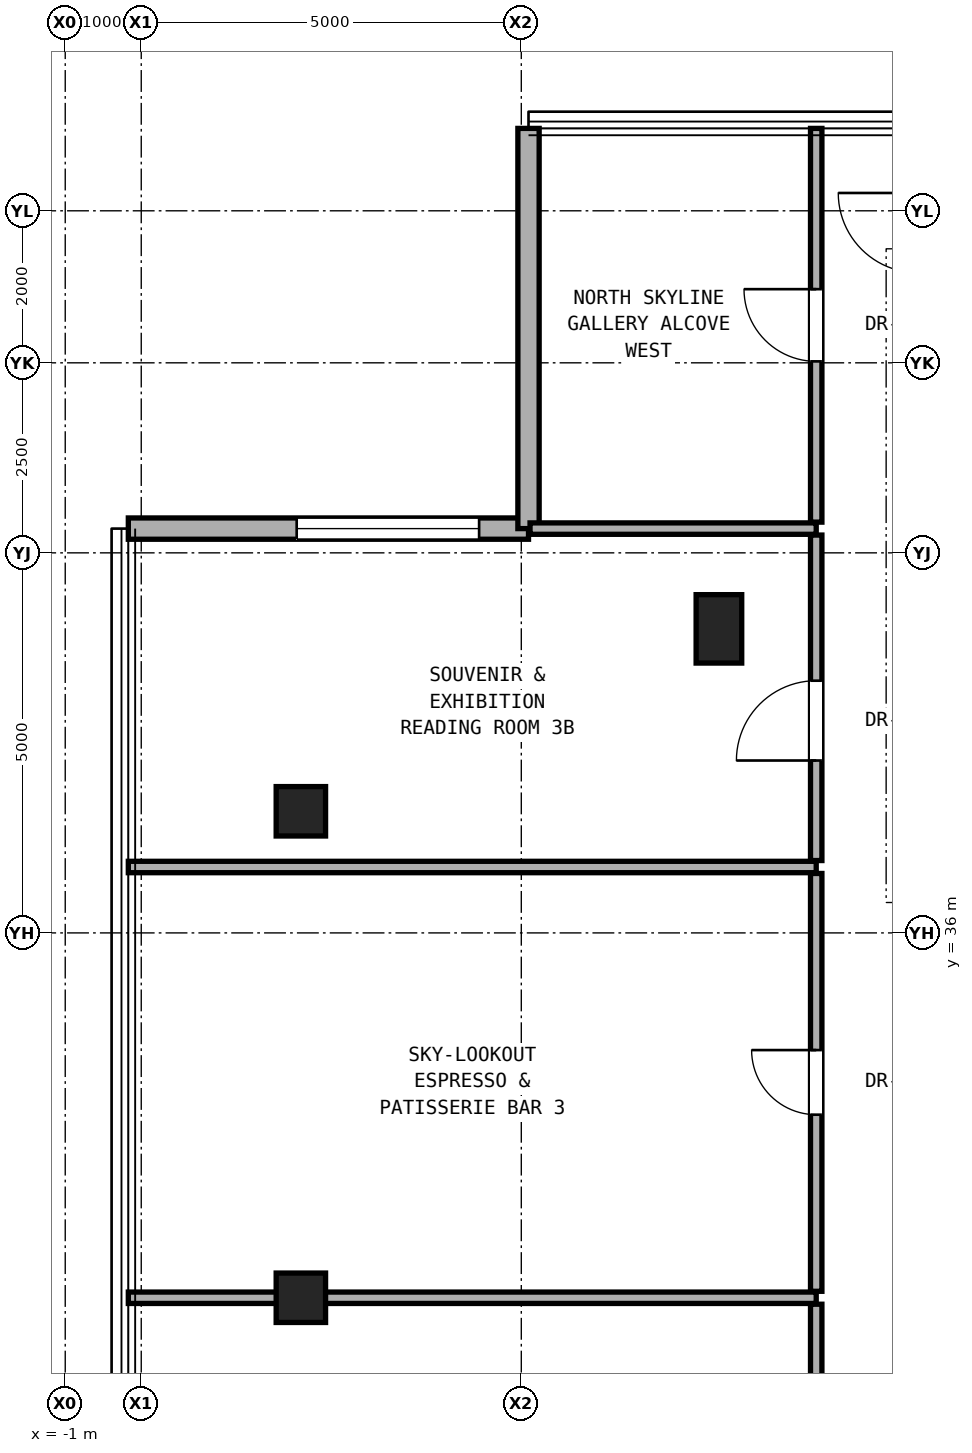
"""IFC4 building model, lengths in metres.
Left out: names, types, materials, properties, quantities, classifications, styles, units other than length and angle.
Written with IfcOpenShell. Run it as: python <this file> out.ifc"""

import sys

from ifc_helpers import new_model, si_unit, direction, frame, frame_2d, origin, origin_2d, place, context, subcontext, project, spatial, rectangle, hollow_rectangle, extrude, element, fill, save


model = new_model("IFC4")
c1 = context("Model", 3, precision=1e-05, world=origin(), true_north=direction((0.0, 1.0)))
c2 = subcontext(c1, "Body", "Model", "MODEL_VIEW")
j1 = project(units=[si_unit("LENGTHUNIT", "METRE"), si_unit("PLANEANGLEUNIT", "RADIAN")], contexts=[c1])
p1 = place(None, origin())
s1 = spatial("IfcSite", under=j1, at=p1, CompositionType="ELEMENT")
p2 = place(p1, origin())
s2 = spatial("IfcBuilding", under=s1, at=p2, CompositionType="ELEMENT")
p3 = place(p2, frame((0.0, 0.0, 259.9)))
s3 = spatial("IfcBuildingStorey", under=s2, at=p3, CompositionType="ELEMENT", Elevation=259.9)
for number, where, z_axis, x_axis in (
    (1, (2.1, 31.2, 0.0), (0.0, 0.0, 1.0), (1.0, 0.0, 0.0)),
    (2, (2.1, 37.6, 0.0), (0.0, 0.0, 1.0), (1.0, 0.0, 0.0)),
):
    element("IfcColumn", number, at=place(p3, frame(where, z_axis=z_axis, x_axis=x_axis)), inside=s3, PredefinedType="COLUMN", context=c2, shape_type="SweptSolid", body=[
        extrude(hollow_rectangle(XDim=0.65, YDim=0.65, WallThickness=0.036, at=origin_2d()), origin(), (0.0, 0.0, 1.0), 3.6),
    ])
p4 = place(p3, frame((7.6, 40.0, 0.0), z_axis=(0.0, 0.0, 1.0), x_axis=(1.0, 0.0, 0.0)))
e3 = element("IfcColumn", 3, at=p4, inside=s3, PredefinedType="PILASTER", context=c2, shape_type="SweptSolid", body=[
    extrude(rectangle(XDim=0.6, YDim=0.9, at=origin_2d()), origin(), (0.0, 0.0, 1.0), 3.6),
])
p5 = place(p3, frame((5.095, 41.319, 0.0), z_axis=(0.0, 0.0, 1.0), x_axis=(-1.0, 0.0, 0.0)))
e4 = element("IfcWall", 4, at=p5, inside=s3, PredefinedType="SOLIDWALL", context=c2, shape_type="SweptSolid", body=[
    extrude(rectangle(XDim=5.265, YDim=0.28, at=frame_2d((2.632, 0.0))), origin(), (0.0, 0.0, 1.0), 2.93),
])
p6 = place(p5, frame((0.65, 0.0, 0.43)))
e5 = element("IfcOpeningElement", 5, at=p6, cuts=e4, PredefinedType="OPENING", context=c2, shape_type="SweptSolid", body=[
    extrude(rectangle(XDim=2.4, YDim=2.35, at=frame_2d((1.2, 1.175))), frame((0.0, 0.15, 0.0), z_axis=(0.0, -1.0, 0.0), x_axis=(1.0, 0.0, 0.0)), (0.0, 0.0, 1.0), 0.3),
])
p7 = place(p3, frame((5.095, 46.584, 0.0), z_axis=(0.0, 0.0, 1.0), x_axis=(0.0, -1.0, 0.0)))
e6 = element("IfcWall", 6, at=p7, inside=s3, PredefinedType="SOLIDWALL", context=c2, shape_type="SweptSolid", body=[
    extrude(rectangle(XDim=5.265, YDim=0.28, at=frame_2d((2.632, 0.0))), origin(), (0.0, 0.0, 1.0), 2.93),
])
for number, where, z_axis, x_axis in (
    (7, (-0.17, 31.2, 0.0), (0.0, 0.0, 1.0), (1.0, 0.0, 0.0)),
    (8, (-0.17, 36.867, 0.0), (0.0, 0.0, 1.0), (1.0, 0.0, 0.0)),
):
    element("IfcWall", number, at=place(p3, frame(where, z_axis=z_axis, x_axis=x_axis)), inside=s3, PredefinedType="PARTITIONING", context=c2, shape_type="SweptSolid", body=[
        extrude(rectangle(XDim=9.05, YDim=0.15, at=frame_2d((4.525, 0.0))), origin(), (0.0, 0.0, 1.0), 2.169),
    ])
p8 = place(p3, frame((5.115, 41.319, 0.0), z_axis=(0.0, 0.0, 1.0), x_axis=(1.0, 0.0, 0.0)))
e9 = element("IfcWall", 9, at=p8, inside=s3, PredefinedType="PARTITIONING", context=c2, shape_type="SweptSolid", body=[
    extrude(rectangle(XDim=3.765, YDim=0.15, at=frame_2d((1.882, 0.0))), origin(), (0.0, 0.0, 1.0), 2.95),
])
p9 = place(p3, frame((8.88, 24.885, 0.0), z_axis=(0.0, 0.0, 1.0), x_axis=(0.0, 1.0, 0.0)))
e10 = element("IfcWall", 10, at=p9, inside=s3, PredefinedType="PARTITIONING", context=c2, shape_type="SweptSolid", body=[
    extrude(rectangle(XDim=6.23, YDim=0.15, at=frame_2d((3.115, 0.0))), origin(), (0.0, 0.0, 1.0), 2.246),
])
p10 = place(p9, frame((2.69, 0.0, 0.0)))
e11 = element("IfcOpeningElement", 11, at=p10, cuts=e10, PredefinedType="OPENING", context=c2, shape_type="SweptSolid", body=[
    extrude(rectangle(XDim=0.85, YDim=2.01, at=frame_2d((0.425, 1.005))), frame((0.0, 0.085, 0.0), z_axis=(0.0, -1.0, 0.0), x_axis=(1.0, 0.0, 0.0)), (0.0, 0.0, 1.0), 0.17),
])
p11 = place(p3, frame((8.88, 31.285, 0.0), z_axis=(0.0, 0.0, 1.0), x_axis=(0.0, 1.0, 0.0)))
e12 = element("IfcWall", 12, at=p11, inside=s3, PredefinedType="PARTITIONING", context=c2, shape_type="SweptSolid", body=[
    extrude(rectangle(XDim=5.497, YDim=0.15, at=frame_2d((2.749, 0.0))), origin(), (0.0, 0.0, 1.0), 2.246),
])
p12 = place(p11, frame((2.323, 0.0, 0.0)))
e13 = element("IfcOpeningElement", 13, at=p12, cuts=e12, PredefinedType="OPENING", context=c2, shape_type="SweptSolid", body=[
    extrude(rectangle(XDim=0.85, YDim=2.01, at=frame_2d((0.425, 1.005))), frame((0.0, 0.085, 0.0), z_axis=(0.0, -1.0, 0.0), x_axis=(1.0, 0.0, 0.0)), (0.0, 0.0, 1.0), 0.17),
])
p13 = place(p3, frame((8.88, 36.952, 0.0), z_axis=(0.0, 0.0, 1.0), x_axis=(0.0, 1.0, 0.0)))
e14 = element("IfcWall", 14, at=p13, inside=s3, PredefinedType="PARTITIONING", context=c2, shape_type="SweptSolid", body=[
    extrude(rectangle(XDim=4.282, YDim=0.15, at=frame_2d((2.141, 0.0))), origin(), (0.0, 0.0, 1.0), 2.393),
])
p14 = place(p13, frame((1.316, 0.0, 0.0)))
e15 = element("IfcOpeningElement", 15, at=p14, cuts=e14, PredefinedType="OPENING", context=c2, shape_type="SweptSolid", body=[
    extrude(rectangle(XDim=1.05, YDim=2.2, at=frame_2d((0.525, 1.1))), frame((0.0, 0.085, 0.0), z_axis=(0.0, -1.0, 0.0), x_axis=(1.0, 0.0, 0.0)), (0.0, 0.0, 1.0), 0.17),
])
p15 = place(p3, frame((8.88, 41.404, 0.0), z_axis=(0.0, 0.0, 1.0), x_axis=(0.0, 1.0, 0.0)))
e16 = element("IfcWall", 16, at=p15, inside=s3, PredefinedType="PARTITIONING", context=c2, shape_type="SweptSolid", body=[
    extrude(rectangle(XDim=5.18, YDim=0.15, at=frame_2d((2.59, 0.0))), origin(), (0.0, 0.0, 1.0), 2.95),
])
p16 = place(p15, frame((2.115, 0.0, 0.0)))
e17 = element("IfcOpeningElement", 17, at=p16, cuts=e16, PredefinedType="OPENING", context=c2, shape_type="SweptSolid", body=[
    extrude(rectangle(XDim=0.95, YDim=2.15, at=frame_2d((0.475, 1.075))), frame((0.0, 0.085, 0.0), z_axis=(0.0, -1.0, 0.0), x_axis=(1.0, 0.0, 0.0)), (0.0, 0.0, 1.0), 0.17),
])
p17 = place(p6, origin())
e18 = element("IfcWindow", 18, at=p17, inside=s3, PartitioningType="SINGLE_PANEL", PredefinedType="WINDOW", context=c2, shape_type="SweptSolid", body=[
    extrude(rectangle(XDim=2.4, YDim=2.35, at=frame_2d((1.2, 1.175))), frame((0.0, 0.03, 0.0), z_axis=(0.0, -1.0, 0.0), x_axis=(1.0, 0.0, 0.0)), (0.0, 0.0, 1.0), 0.06),
])
fill(e5, e18)
p18 = place(p12, origin())
e19 = element("IfcDoor", 19, at=p18, inside=s3, OperationType="SINGLE_SWING_RIGHT", PredefinedType="DOOR", context=c2, shape_type="SweptSolid", body=[
    extrude(rectangle(XDim=0.85, YDim=2.01, at=frame_2d((0.425, 1.005))), frame((0.0, 0.025, 0.0), z_axis=(0.0, -1.0, 0.0), x_axis=(1.0, 0.0, 0.0)), (0.0, 0.0, 1.0), 0.05),
])
fill(e13, e19)
p19 = place(p14, origin())
e20 = element("IfcDoor", 20, at=p19, inside=s3, OperationType="SINGLE_SWING_LEFT", PredefinedType="DOOR", context=c2, shape_type="SweptSolid", body=[
    extrude(rectangle(XDim=1.05, YDim=2.2, at=frame_2d((0.525, 1.1))), frame((0.0, 0.025, 0.0), z_axis=(0.0, -1.0, 0.0), x_axis=(1.0, 0.0, 0.0)), (0.0, 0.0, 1.0), 0.05),
])
fill(e15, e20)
p20 = place(p16, origin())
e21 = element("IfcDoor", 21, at=p20, inside=s3, OperationType="SINGLE_SWING_RIGHT", PredefinedType="DOOR", context=c2, shape_type="SweptSolid", body=[
    extrude(rectangle(XDim=0.95, YDim=2.15, at=frame_2d((0.475, 1.075))), frame((0.0, 0.025, 0.0), z_axis=(0.0, -1.0, 0.0), x_axis=(1.0, 0.0, 0.0)), (0.0, 0.0, 1.0), 0.05),
])
fill(e17, e21)
save(model, sys.argv[1])
